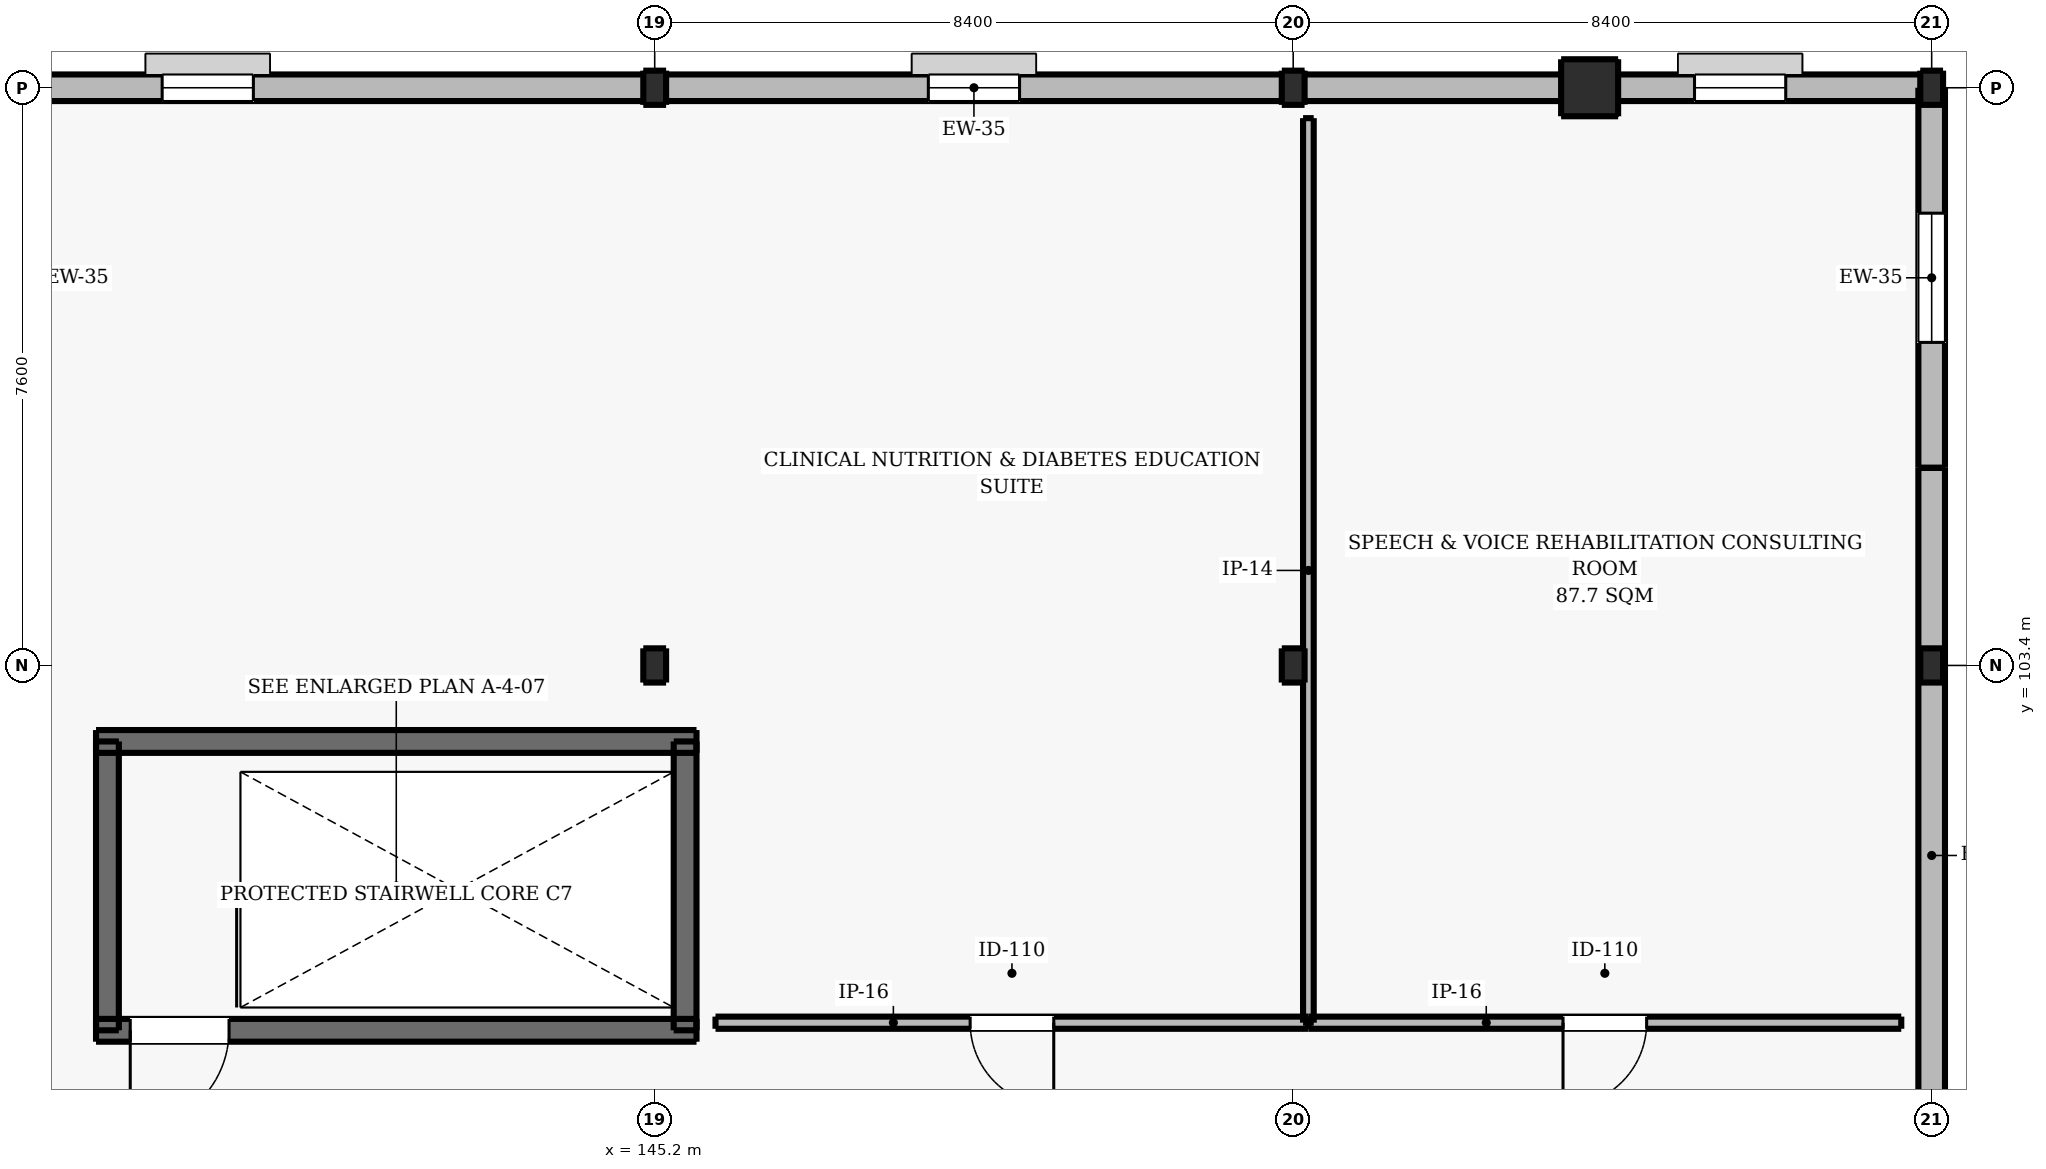
"""IFC4 building model, lengths in metres.
Left out: names, types, materials, properties, quantities, classifications, styles, units other than length and angle.
Written with IfcOpenShell. Run it as: python <this file> out.ifc"""

import sys

from ifc_helpers import new_model, si_unit, direction, frame, frame_2d, origin, origin_2d, place, context, subcontext, project, spatial, rectangle, i_section, extrude, element, fill, save


model = new_model("IFC4")
c1 = context("Model", 3, precision=1e-05, world=origin(), true_north=direction((0.0, 1.0)))
c2 = subcontext(c1, "Body", "Model", "MODEL_VIEW")
j1 = project(units=[si_unit("LENGTHUNIT", "METRE"), si_unit("PLANEANGLEUNIT", "RADIAN")], contexts=[c1])
p1 = place(None, origin())
s1 = spatial("IfcSite", under=j1, at=p1, CompositionType="ELEMENT")
p2 = place(p1, origin())
s2 = spatial("IfcBuilding", under=s1, at=p2, CompositionType="ELEMENT")
p3 = place(p2, frame((0.0, 0.0, 5.1)))
s3 = spatial("IfcBuildingStorey", under=s2, at=p3, CompositionType="ELEMENT", Elevation=5.1)
for number, where, z_axis, x_axis in (
    (1, (145.2, 103.4, 0.0), (0.0, 0.0, 1.0), (1.0, 0.0, 0.0)),
    (2, (145.2, 111.0, 0.0), (0.0, 0.0, 1.0), (1.0, 0.0, 0.0)),
    (3, (153.6, 103.4, 0.0), (0.0, 0.0, 1.0), (1.0, 0.0, 0.0)),
    (4, (153.6, 111.0, 0.0), (0.0, 0.0, 1.0), (1.0, 0.0, 0.0)),
):
    element("IfcColumn", number, at=place(p3, frame(where, z_axis=z_axis, x_axis=x_axis)), inside=s3, PredefinedType="COLUMN", context=c2, shape_type="SweptSolid", body=[
        extrude(i_section(OverallWidth=0.3, OverallDepth=0.45, WebThickness=0.014, FlangeThickness=0.026, FilletRadius=0.027, at=origin_2d()), origin(), (0.0, 0.0, 1.0), 4.5),
    ])
p4 = place(p3, frame((157.5, 111.0, 0.0), z_axis=(0.0, 0.0, 1.0), x_axis=(1.0, 0.0, 0.0)))
e5 = element("IfcColumn", 5, at=p4, inside=s3, PredefinedType="PILASTER", context=c2, shape_type="SweptSolid", body=[
    extrude(rectangle(XDim=0.75, YDim=0.75, at=origin_2d()), origin(), (0.0, 0.0, 1.0), 4.5),
])
for number, where, z_axis, x_axis in (
    (6, (162.0, 103.4, 0.0), (0.0, 0.0, 1.0), (1.0, 0.0, 0.0)),
    (7, (162.0, 111.0, 0.0), (0.0, 0.0, 1.0), (1.0, 0.0, 0.0)),
):
    element("IfcColumn", number, at=place(p3, frame(where, z_axis=z_axis, x_axis=x_axis)), inside=s3, PredefinedType="COLUMN", context=c2, shape_type="SweptSolid", body=[
        extrude(i_section(OverallWidth=0.3, OverallDepth=0.45, WebThickness=0.014, FlangeThickness=0.026, FilletRadius=0.027, at=origin_2d()), origin(), (0.0, 0.0, 1.0), 4.5),
    ])
p5 = place(p3, frame((137.85, 98.6, 0.0), z_axis=(0.0, 0.0, 1.0), x_axis=(1.0, 0.0, 0.0)))
e8 = element("IfcWall", 8, at=p5, inside=s3, PredefinedType="SHEAR", context=c2, shape_type="SweptSolid", body=[
    extrude(rectangle(XDim=7.9, YDim=0.3, at=frame_2d((3.95, 0.0))), origin(), (0.0, 0.0, 1.0), 4.5),
])
p6 = place(p5, frame((0.45, 0.0, 0.0)))
e9 = element("IfcOpeningElement", 9, at=p6, cuts=e8, PredefinedType="OPENING", context=c2, shape_type="SweptSolid", body=[
    extrude(rectangle(XDim=1.3, YDim=2.15, at=frame_2d((0.65, 1.075))), frame((0.0, 0.16, 0.0), z_axis=(0.0, -1.0, 0.0), x_axis=(1.0, 0.0, 0.0)), (0.0, 0.0, 1.0), 0.32),
])
p7 = place(p3, frame((137.85, 102.4, 0.0), z_axis=(0.0, 0.0, 1.0), x_axis=(1.0, 0.0, 0.0)))
e10 = element("IfcWall", 10, at=p7, inside=s3, PredefinedType="SHEAR", context=c2, shape_type="SweptSolid", body=[
    extrude(rectangle(XDim=7.9, YDim=0.3, at=frame_2d((3.95, 0.0))), origin(), (0.0, 0.0, 1.0), 4.5),
])
for number, where, z_axis, x_axis in (
    (11, (138.0, 98.6, 0.0), (0.0, 0.0, 1.0), (0.0, 1.0, 0.0)),
    (12, (145.6, 98.6, 0.0), (0.0, 0.0, 1.0), (0.0, 1.0, 0.0)),
):
    element("IfcWall", number, at=place(p3, frame(where, z_axis=z_axis, x_axis=x_axis)), inside=s3, PredefinedType="SHEAR", context=c2, shape_type="SweptSolid", body=[
        extrude(rectangle(XDim=3.8, YDim=0.3, at=frame_2d((1.9, 0.0))), origin(), (0.0, 0.0, 1.0), 4.5),
    ])
p8 = place(p3, frame((136.8, 111.0, 0.0), z_axis=(0.0, 0.0, 1.0), x_axis=(1.0, 0.0, 0.0)))
e13 = element("IfcWall", 13, at=p8, inside=s3, PredefinedType="SOLIDWALL", context=c2, shape_type="SweptSolid", body=[
    extrude(rectangle(XDim=25.2, YDim=0.35, at=frame_2d((12.6, 0.0))), origin(), (0.0, 0.0, 1.0), 3.33),
])
p9 = place(p8, frame((1.92, 0.0, 1.065)))
e14 = element("IfcOpeningElement", 14, at=p9, cuts=e13, PredefinedType="OPENING", context=c2, shape_type="SweptSolid", body=[
    extrude(rectangle(XDim=1.2, YDim=1.2, at=frame_2d((0.6, 0.6))), frame((0.0, 0.185, 0.0), z_axis=(0.0, -1.0, 0.0), x_axis=(1.0, 0.0, 0.0)), (0.0, 0.0, 1.0), 0.37),
])
p10 = place(p8, frame((12.0, 0.0, 1.065)))
e15 = element("IfcOpeningElement", 15, at=p10, cuts=e13, PredefinedType="OPENING", context=c2, shape_type="SweptSolid", body=[
    extrude(rectangle(XDim=1.2, YDim=1.2, at=frame_2d((0.6, 0.6))), frame((0.0, 0.185, 0.0), z_axis=(0.0, -1.0, 0.0), x_axis=(1.0, 0.0, 0.0)), (0.0, 0.0, 1.0), 0.37),
])
p11 = place(p8, frame((22.08, 0.0, 1.065)))
e16 = element("IfcOpeningElement", 16, at=p11, cuts=e13, PredefinedType="OPENING", context=c2, shape_type="SweptSolid", body=[
    extrude(rectangle(XDim=1.2, YDim=1.2, at=frame_2d((0.6, 0.6))), frame((0.0, 0.185, 0.0), z_axis=(0.0, -1.0, 0.0), x_axis=(1.0, 0.0, 0.0)), (0.0, 0.0, 1.0), 0.37),
])
p12 = place(p3, frame((162.0, 111.0, 0.0), z_axis=(0.0, 0.0, 1.0), x_axis=(0.0, -1.0, 0.0)))
e17 = element("IfcWall", 17, at=p12, inside=s3, PredefinedType="SOLIDWALL", context=c2, shape_type="SweptSolid", body=[
    extrude(rectangle(XDim=5.0, YDim=0.35, at=frame_2d((2.5, 0.0))), origin(), (0.0, 0.0, 1.0), 3.33),
])
p13 = place(p12, frame((1.65, 0.0, 0.95)))
e18 = element("IfcOpeningElement", 18, at=p13, cuts=e17, PredefinedType="OPENING", context=c2, shape_type="SweptSolid", body=[
    extrude(rectangle(XDim=1.7, YDim=2.0, at=frame_2d((0.85, 1.0))), frame((0.0, 0.185, 0.0), z_axis=(0.0, -1.0, 0.0), x_axis=(1.0, 0.0, 0.0)), (0.0, 0.0, 1.0), 0.37),
])
p14 = place(p3, frame((162.0, 106.0, 0.0), z_axis=(0.0, 0.0, 1.0), x_axis=(0.0, -1.0, 0.0)))
e19 = element("IfcWall", 19, at=p14, inside=s3, PredefinedType="SOLIDWALL", context=c2, shape_type="SweptSolid", body=[
    extrude(rectangle(XDim=10.2, YDim=0.35, at=frame_2d((5.1, 0.0))), origin(), (0.0, 0.0, 1.0), 3.33),
])
p15 = place(p3, frame((146.0, 98.7, 0.0), z_axis=(0.0, 0.0, 1.0), x_axis=(1.0, 0.0, 0.0)))
e20 = element("IfcWall", 20, at=p15, inside=s3, PredefinedType="PARTITIONING", context=c2, shape_type="SweptSolid", body=[
    extrude(rectangle(XDim=7.8, YDim=0.16, at=frame_2d((3.9, 0.0))), origin(), (0.0, 0.0, 1.0), 4.21),
])
p16 = place(p15, frame((3.35, 0.0, 0.0)))
e21 = element("IfcOpeningElement", 21, at=p16, cuts=e20, PredefinedType="OPENING", context=c2, shape_type="SweptSolid", body=[
    extrude(rectangle(XDim=1.1, YDim=2.15, at=frame_2d((0.55, 1.075))), frame((0.0, 0.09, 0.0), z_axis=(0.0, -1.0, 0.0), x_axis=(1.0, 0.0, 0.0)), (0.0, 0.0, 1.0), 0.18),
])
p17 = place(p3, frame((153.8, 98.7, 0.0), z_axis=(0.0, 0.0, 1.0), x_axis=(0.0, 1.0, 0.0)))
e22 = element("IfcWall", 22, at=p17, inside=s3, PredefinedType="PARTITIONING", context=c2, shape_type="SweptSolid", body=[
    extrude(rectangle(XDim=11.9, YDim=0.14, at=frame_2d((5.95, 0.0))), origin(), (0.0, 0.0, 1.0), 3.87),
])
p18 = place(p3, frame((153.8, 98.7, 0.0), z_axis=(0.0, 0.0, 1.0), x_axis=(1.0, 0.0, 0.0)))
e23 = element("IfcWall", 23, at=p18, inside=s3, PredefinedType="PARTITIONING", context=c2, shape_type="SweptSolid", body=[
    extrude(rectangle(XDim=7.8, YDim=0.16, at=frame_2d((3.9, 0.0))), origin(), (0.0, 0.0, 1.0), 4.21),
])
p19 = place(p18, frame((3.35, 0.0, 0.0)))
e24 = element("IfcOpeningElement", 24, at=p19, cuts=e23, PredefinedType="OPENING", context=c2, shape_type="SweptSolid", body=[
    extrude(rectangle(XDim=1.1, YDim=2.15, at=frame_2d((0.55, 1.075))), frame((0.0, 0.09, 0.0), z_axis=(0.0, -1.0, 0.0), x_axis=(1.0, 0.0, 0.0)), (0.0, 0.0, 1.0), 0.18),
])
p20 = place(p9, origin())
e25 = element("IfcWindow", 25, at=p20, inside=s3, PartitioningType="SINGLE_PANEL", PredefinedType="WINDOW", context=c2, shape_type="SweptSolid", body=[
    extrude(rectangle(XDim=1.2, YDim=1.2, at=frame_2d((0.6, 0.6))), frame((0.0, 0.03, 0.0), z_axis=(0.0, -1.0, 0.0), x_axis=(1.0, 0.0, 0.0)), (0.0, 0.0, 1.0), 0.06),
])
fill(e14, e25)
p21 = place(p10, origin())
e26 = element("IfcWindow", 26, at=p21, inside=s3, PartitioningType="SINGLE_PANEL", PredefinedType="WINDOW", context=c2, shape_type="SweptSolid", body=[
    extrude(rectangle(XDim=1.2, YDim=1.2, at=frame_2d((0.6, 0.6))), frame((0.0, 0.03, 0.0), z_axis=(0.0, -1.0, 0.0), x_axis=(1.0, 0.0, 0.0)), (0.0, 0.0, 1.0), 0.06),
])
fill(e15, e26)
p22 = place(p11, origin())
e27 = element("IfcWindow", 27, at=p22, inside=s3, PartitioningType="SINGLE_PANEL", PredefinedType="WINDOW", context=c2, shape_type="SweptSolid", body=[
    extrude(rectangle(XDim=1.2, YDim=1.2, at=frame_2d((0.6, 0.6))), frame((0.0, 0.03, 0.0), z_axis=(0.0, -1.0, 0.0), x_axis=(1.0, 0.0, 0.0)), (0.0, 0.0, 1.0), 0.06),
])
fill(e16, e27)
p23 = place(p13, origin())
e28 = element("IfcWindow", 28, at=p23, inside=s3, PartitioningType="SINGLE_PANEL", PredefinedType="WINDOW", context=c2, shape_type="SweptSolid", body=[
    extrude(rectangle(XDim=1.7, YDim=2.0, at=frame_2d((0.85, 1.0))), frame((0.0, 0.03, 0.0), z_axis=(0.0, -1.0, 0.0), x_axis=(1.0, 0.0, 0.0)), (0.0, 0.0, 1.0), 0.06),
])
fill(e18, e28)
p24 = place(p6, frame((1.3, 0.0, 0.0), z_axis=(0.0, 0.0, 1.0), x_axis=(-1.0, 0.0, 0.0)))
e29 = element("IfcDoor", 29, at=p24, inside=s3, OperationType="SINGLE_SWING_LEFT", PredefinedType="DOOR", context=c2, shape_type="SweptSolid", body=[
    extrude(rectangle(XDim=1.3, YDim=2.15, at=frame_2d((0.65, 1.075))), frame((0.0, 0.025, 0.0), z_axis=(0.0, -1.0, 0.0), x_axis=(1.0, 0.0, 0.0)), (0.0, 0.0, 1.0), 0.05),
])
fill(e9, e29)
p25 = place(p16, frame((1.1, 0.0, 0.0), z_axis=(0.0, 0.0, 1.0), x_axis=(-1.0, 0.0, 0.0)))
e30 = element("IfcDoor", 30, at=p25, inside=s3, OperationType="SINGLE_SWING_RIGHT", PredefinedType="DOOR", context=c2, shape_type="SweptSolid", body=[
    extrude(rectangle(XDim=1.1, YDim=2.15, at=frame_2d((0.55, 1.075))), frame((0.0, 0.025, 0.0), z_axis=(0.0, -1.0, 0.0), x_axis=(1.0, 0.0, 0.0)), (0.0, 0.0, 1.0), 0.05),
])
fill(e21, e30)
p26 = place(p19, frame((1.1, 0.0, 0.0), z_axis=(0.0, 0.0, 1.0), x_axis=(-1.0, 0.0, 0.0)))
e31 = element("IfcDoor", 31, at=p26, inside=s3, OperationType="SINGLE_SWING_LEFT", PredefinedType="DOOR", context=c2, shape_type="SweptSolid", body=[
    extrude(rectangle(XDim=1.1, YDim=2.15, at=frame_2d((0.55, 1.075))), frame((0.0, 0.025, 0.0), z_axis=(0.0, -1.0, 0.0), x_axis=(1.0, 0.0, 0.0)), (0.0, 0.0, 1.0), 0.05),
])
fill(e24, e31)
save(model, sys.argv[1])
